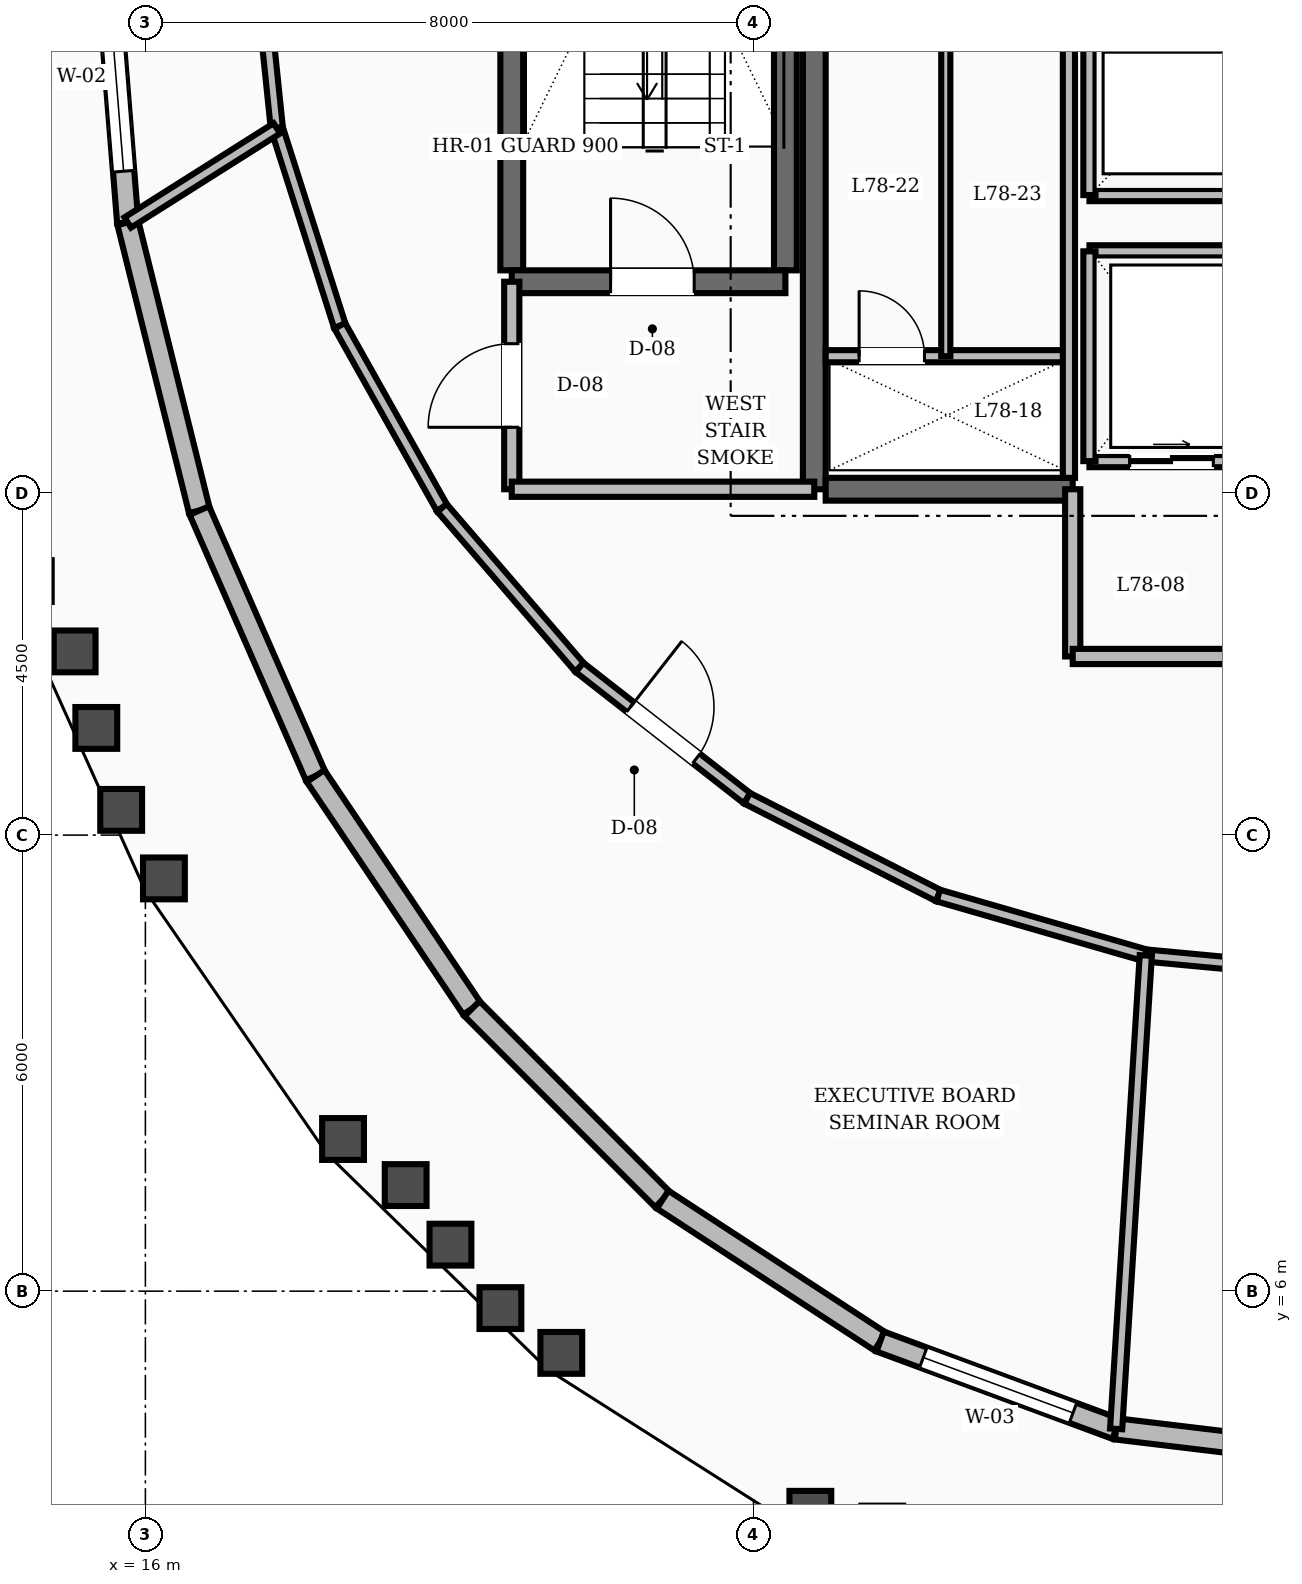
"""IFC4 building model, lengths in metres.
Left out: names, types, materials, properties, quantities, classifications, styles, units other than length and angle.
Written with IfcOpenShell. Run it as: python <this file> out.ifc"""

import sys

from ifc_helpers import new_model, si_unit, direction, frame, frame_2d, origin, place, context, subcontext, project, spatial, rectangle, extrude, element, fill, save


model = new_model("IFC4")
c1 = context("Model", 3, precision=1e-05, world=origin(), true_north=direction((0.0, 1.0)))
c2 = subcontext(c1, "Body", "Model", "MODEL_VIEW")
j1 = project(units=[si_unit("LENGTHUNIT", "METRE"), si_unit("PLANEANGLEUNIT", "RADIAN")], contexts=[c1])
p1 = place(None, origin())
s1 = spatial("IfcSite", under=j1, at=p1, CompositionType="ELEMENT")
p2 = place(p1, origin())
s2 = spatial("IfcBuilding", under=s1, at=p2, CompositionType="ELEMENT")
p3 = place(p2, frame((0.0, 0.0, 297.6)))
s3 = spatial("IfcBuildingStorey", under=s2, at=p3, CompositionType="ELEMENT", Elevation=297.6)
p4 = place(p3, frame((24.8, 16.55, 0.0), z_axis=(0.0, 0.0, 1.0), x_axis=(0.0, 1.0, 0.0)))
e1 = element("IfcWall", 1, at=p4, inside=s3, PredefinedType="SHEAR", context=c2, shape_type="SweptSolid", body=[
    extrude(rectangle(XDim=6.3, YDim=0.3, at=frame_2d((3.15, 0.0))), origin(), (0.0, 0.0, 1.0), 4.8),
])
p5 = place(p3, frame((24.95, 16.55, 0.0), z_axis=(0.0, 0.0, 1.0), x_axis=(1.0, 0.0, 0.0)))
e2 = element("IfcWall", 2, at=p5, inside=s3, PredefinedType="SHEAR", context=c2, shape_type="SweptSolid", body=[
    extrude(rectangle(XDim=3.25, YDim=0.3, at=frame_2d((1.625, 0.0))), origin(), (0.0, 0.0, 1.0), 4.8),
])
for number, where, z_axis, x_axis in (
    (3, (20.82, 19.43, 0.0), (0.0, 0.0, 1.0), (0.0, 1.0, 0.0)),
    (4, (24.42, 19.43, 0.0), (0.0, 0.0, 1.0), (0.0, 1.0, 0.0)),
):
    element("IfcWall", number, at=place(p3, frame(where, z_axis=z_axis, x_axis=x_axis)), inside=s3, PredefinedType="SHEAR", context=c2, shape_type="SweptSolid", body=[
        extrude(rectangle(XDim=8.74, YDim=0.3, at=frame_2d((4.37, 0.0))), origin(), (0.0, 0.0, 1.0), 4.8),
    ])
p6 = place(p3, frame((20.82, 19.28, 0.0), z_axis=(0.0, 0.0, 1.0), x_axis=(1.0, 0.0, 0.0)))
e5 = element("IfcWall", 5, at=p6, inside=s3, PredefinedType="SHEAR", context=c2, shape_type="SweptSolid", body=[
    extrude(rectangle(XDim=3.6, YDim=0.3, at=frame_2d((1.8, 0.0))), origin(), (0.0, 0.0, 1.0), 4.8),
])
p7 = place(p6, frame((1.3, 0.0, 0.0)))
e6 = element("IfcOpeningElement", 6, at=p7, cuts=e5, PredefinedType="OPENING", context=c2, shape_type="SweptSolid", body=[
    extrude(rectangle(XDim=1.1, YDim=2.1, at=frame_2d((0.55, 1.05))), frame((0.0, 0.16, 0.0), z_axis=(0.0, -1.0, 0.0), x_axis=(1.0, 0.0, 0.0)), (0.0, 0.0, 1.0), 0.32),
])
p8 = place(p3, frame((15.45, 24.0, 0.0), z_axis=(0.0, 0.0, 1.0), x_axis=(0.080459393336, -0.996757887365, 0.0)))
e7 = element("IfcWall", 7, at=p8, inside=s3, PredefinedType="STANDARD", context=c2, shape_type="SweptSolid", body=[
    extrude(rectangle(XDim=3.954, YDim=0.28, at=frame_2d((1.977, 0.0))), origin(), (0.0, 0.0, 1.0), 3.71),
])
p9 = place(p8, frame((0.677, 0.0, 0.8)))
e8 = element("IfcOpeningElement", 8, at=p9, cuts=e7, PredefinedType="OPENING", context=c2, shape_type="SweptSolid", body=[
    extrude(rectangle(XDim=2.6, YDim=1.65, at=frame_2d((1.3, 0.825))), frame((0.0, 0.15, 0.0), z_axis=(0.0, -1.0, 0.0), x_axis=(1.0, 0.0, 0.0)), (0.0, 0.0, 1.0), 0.3),
])
p10 = place(p3, frame((15.768, 20.059, 0.0), z_axis=(0.0, 0.0, 1.0), x_axis=(0.241167143082, -0.970483595481, 0.0)))
e9 = element("IfcWall", 9, at=p10, inside=s3, PredefinedType="STANDARD", context=c2, shape_type="SweptSolid", body=[
    extrude(rectangle(XDim=3.905, YDim=0.28, at=frame_2d((1.952, 0.0))), origin(), (0.0, 0.0, 1.0), 3.71),
])
p11 = place(p3, frame((16.71, 16.27, 0.0), z_axis=(0.0, 0.0, 1.0), x_axis=(0.401195046879, -0.91599264973, 0.0)))
e10 = element("IfcWall", 10, at=p11, inside=s3, PredefinedType="STANDARD", context=c2, shape_type="SweptSolid", body=[
    extrude(rectangle(XDim=3.812, YDim=0.28, at=frame_2d((1.906, 0.0))), origin(), (0.0, 0.0, 1.0), 3.71),
])
p12 = place(p3, frame((18.239, 12.778, 0.0), z_axis=(0.0, 0.0, 1.0), x_axis=(0.55793393731, -0.82988536654, 0.0)))
e11 = element("IfcWall", 11, at=p12, inside=s3, PredefinedType="STANDARD", context=c2, shape_type="SweptSolid", body=[
    extrude(rectangle(XDim=3.689, YDim=0.28, at=frame_2d((1.844, 0.0))), origin(), (0.0, 0.0, 1.0), 3.71),
])
p13 = place(p3, frame((20.297, 9.716, 0.0), z_axis=(0.0, 0.0, 1.0), x_axis=(0.706556343152, -0.707656791073, 0.0)))
e12 = element("IfcWall", 12, at=p13, inside=s3, PredefinedType="STANDARD", context=c2, shape_type="SweptSolid", body=[
    extrude(rectangle(XDim=3.55, YDim=0.28, at=frame_2d((1.775, 0.0))), origin(), (0.0, 0.0, 1.0), 3.71),
])
p14 = place(p3, frame((22.805, 7.204, 0.0), z_axis=(0.0, 0.0, 1.0), x_axis=(0.837506795295, -0.546426909875, 0.0)))
e13 = element("IfcWall", 13, at=p14, inside=s3, PredefinedType="STANDARD", context=c2, shape_type="SweptSolid", body=[
    extrude(rectangle(XDim=3.416, YDim=0.28, at=frame_2d((1.708, 0.0))), origin(), (0.0, 0.0, 1.0), 3.71),
])
p15 = place(p3, frame((25.667, 5.338, 0.0), z_axis=(0.0, 0.0, 1.0), x_axis=(0.937772775671, -0.347249508582, 0.0)))
e14 = element("IfcWall", 14, at=p15, inside=s3, PredefinedType="STANDARD", context=c2, shape_type="SweptSolid", body=[
    extrude(rectangle(XDim=3.311, YDim=0.28, at=frame_2d((1.655, 0.0))), origin(), (0.0, 0.0, 1.0), 3.71),
])
p16 = place(p15, frame((0.605, 0.0, 0.8)))
e15 = element("IfcOpeningElement", 15, at=p16, cuts=e14, PredefinedType="OPENING", context=c2, shape_type="SweptSolid", body=[
    extrude(rectangle(XDim=2.1, YDim=1.65, at=frame_2d((1.05, 0.825))), frame((0.0, 0.15, 0.0), z_axis=(0.0, -1.0, 0.0), x_axis=(1.0, 0.0, 0.0)), (0.0, 0.0, 1.0), 0.3),
])
p17 = place(p3, frame((28.771, 4.188, 0.0), z_axis=(0.0, 0.0, 1.0), x_axis=(0.992859065369, -0.119293236663, 0.0)))
e16 = element("IfcWall", 16, at=p17, inside=s3, PredefinedType="STANDARD", context=c2, shape_type="SweptSolid", body=[
    extrude(rectangle(XDim=3.252, YDim=0.28, at=frame_2d((1.626, 0.0))), origin(), (0.0, 0.0, 1.0), 3.71),
])
p18 = place(p3, frame((20.82, 16.55, 0.0), z_axis=(0.0, 0.0, 1.0), x_axis=(0.0, 1.0, 0.0)))
e17 = element("IfcWall", 17, at=p18, inside=s3, PredefinedType="SOLIDWALL", context=c2, shape_type="SweptSolid", body=[
    extrude(rectangle(XDim=2.73, YDim=0.2, at=frame_2d((1.365, 0.0))), origin(), (0.0, 0.0, 1.0), 3.71),
])
p19 = place(p18, frame((0.815, 0.0, 0.0)))
e18 = element("IfcOpeningElement", 18, at=p19, cuts=e17, PredefinedType="OPENING", context=c2, shape_type="SweptSolid", body=[
    extrude(rectangle(XDim=1.1, YDim=2.1, at=frame_2d((0.55, 1.05))), frame((0.0, 0.11, 0.0), z_axis=(0.0, -1.0, 0.0), x_axis=(1.0, 0.0, 0.0)), (0.0, 0.0, 1.0), 0.22),
])
p20 = place(p3, frame((20.82, 16.55, 0.0), z_axis=(0.0, 0.0, 1.0), x_axis=(1.0, 0.0, 0.0)))
e19 = element("IfcWall", 19, at=p20, inside=s3, PredefinedType="SOLIDWALL", context=c2, shape_type="SweptSolid", body=[
    extrude(rectangle(XDim=3.98, YDim=0.2, at=frame_2d((1.99, 0.0))), origin(), (0.0, 0.0, 1.0), 3.71),
])
p21 = place(p3, frame((28.2, 14.35, 0.0), z_axis=(0.0, 0.0, 1.0), x_axis=(0.0, 1.0, 0.0)))
e20 = element("IfcWall", 20, at=p21, inside=s3, PredefinedType="SOLIDWALL", context=c2, shape_type="SweptSolid", body=[
    extrude(rectangle(XDim=2.2, YDim=0.2, at=frame_2d((1.1, 0.0))), origin(), (0.0, 0.0, 1.0), 3.71),
])
p22 = place(p3, frame((28.2, 14.35, 0.0), z_axis=(0.0, 0.0, 1.0), x_axis=(1.0, 0.0, 0.0)))
e21 = element("IfcWall", 21, at=p22, inside=s3, PredefinedType="SOLIDWALL", context=c2, shape_type="SweptSolid", body=[
    extrude(rectangle(XDim=7.6, YDim=0.2, at=frame_2d((3.8, 0.0))), origin(), (0.0, 0.0, 1.0), 3.71),
])
p23 = place(p22, frame((3.2, 0.0, 0.0)))
e22 = element("IfcOpeningElement", 22, at=p23, cuts=e21, PredefinedType="OPENING", context=c2, shape_type="SweptSolid", body=[
    extrude(rectangle(XDim=1.2, YDim=2.1, at=frame_2d((0.6, 1.05))), frame((0.0, 0.11, 0.0), z_axis=(0.0, -1.0, 0.0), x_axis=(1.0, 0.0, 0.0)), (0.0, 0.0, 1.0), 0.22),
])
for number, where, z_axis, x_axis in (
    (23, (28.42, 20.42, 0.0), (0.0, 0.0, 1.0), (1.0, 0.0, 0.0)),
    (24, (28.42, 20.42, 0.0), (0.0, 0.0, 1.0), (0.0, 1.0, 0.0)),
):
    element("IfcWall", number, at=place(p3, frame(where, z_axis=z_axis, x_axis=x_axis)), inside=s3, PredefinedType="SOLIDWALL", context=c2, shape_type="SweptSolid", body=[
        extrude(rectangle(XDim=2.16, YDim=0.16, at=frame_2d((1.08, 0.0))), origin(), (0.0, 0.0, 1.0), 3.71),
    ])
p24 = place(p3, frame((28.42, 16.92, 0.0), z_axis=(0.0, 0.0, 1.0), x_axis=(1.0, 0.0, 0.0)))
e25 = element("IfcWall", 25, at=p24, inside=s3, PredefinedType="SOLIDWALL", context=c2, shape_type="SweptSolid", body=[
    extrude(rectangle(XDim=7.16, YDim=0.16, at=frame_2d((3.58, 0.0))), origin(), (0.0, 0.0, 1.0), 3.71),
])
p25 = place(p24, frame((0.53, 0.0, 0.0)))
e26 = element("IfcOpeningElement", 26, at=p25, cuts=e25, PredefinedType="OPENING", context=c2, shape_type="SweptSolid", body=[
    extrude(rectangle(XDim=1.1, YDim=2.15, at=frame_2d((0.55, 1.075))), frame((0.0, 0.09, 0.0), z_axis=(0.0, -1.0, 0.0), x_axis=(1.0, 0.0, 0.0)), (0.0, 0.0, 1.0), 0.18),
])
p26 = place(p24, frame((3.03, 0.0, 0.0)))
e27 = element("IfcOpeningElement", 27, at=p26, cuts=e25, PredefinedType="OPENING", context=c2, shape_type="SweptSolid", body=[
    extrude(rectangle(XDim=1.1, YDim=2.15, at=frame_2d((0.55, 1.075))), frame((0.0, 0.09, 0.0), z_axis=(0.0, -1.0, 0.0), x_axis=(1.0, 0.0, 0.0)), (0.0, 0.0, 1.0), 0.18),
])
p27 = place(p24, frame((5.53, 0.0, 0.0)))
e28 = element("IfcOpeningElement", 28, at=p27, cuts=e25, PredefinedType="OPENING", context=c2, shape_type="SweptSolid", body=[
    extrude(rectangle(XDim=1.1, YDim=2.15, at=frame_2d((0.55, 1.075))), frame((0.0, 0.09, 0.0), z_axis=(0.0, -1.0, 0.0), x_axis=(1.0, 0.0, 0.0)), (0.0, 0.0, 1.0), 0.18),
])
p28 = place(p3, frame((28.42, 19.68, 0.0), z_axis=(0.0, 0.0, 1.0), x_axis=(1.0, 0.0, 0.0)))
e29 = element("IfcWall", 29, at=p28, inside=s3, PredefinedType="SOLIDWALL", context=c2, shape_type="SweptSolid", body=[
    extrude(rectangle(XDim=7.16, YDim=0.16, at=frame_2d((3.58, 0.0))), origin(), (0.0, 0.0, 1.0), 3.71),
])
p29 = place(p3, frame((28.42, 16.92, 0.0), z_axis=(0.0, 0.0, 1.0), x_axis=(0.0, 1.0, 0.0)))
e30 = element("IfcWall", 30, at=p29, inside=s3, PredefinedType="SOLIDWALL", context=c2, shape_type="SweptSolid", body=[
    extrude(rectangle(XDim=2.76, YDim=0.16, at=frame_2d((1.38, 0.0))), origin(), (0.0, 0.0, 1.0), 3.71),
])
p30 = place(p3, frame((24.95, 18.3, 0.0), z_axis=(0.0, 0.0, 1.0), x_axis=(1.0, 0.0, 0.0)))
e31 = element("IfcWall", 31, at=p30, inside=s3, PredefinedType="SOLIDWALL", context=c2, shape_type="SweptSolid", body=[
    extrude(rectangle(XDim=3.2, YDim=0.16, at=frame_2d((1.6, 0.0))), origin(), (0.0, 0.0, 1.0), 3.71),
])
p31 = place(p30, frame((0.44, 0.0, 0.0)))
e32 = element("IfcOpeningElement", 32, at=p31, cuts=e31, PredefinedType="OPENING", context=c2, shape_type="SweptSolid", body=[
    extrude(rectangle(XDim=0.86, YDim=2.05, at=frame_2d((0.43, 1.025))), frame((0.0, 0.09, 0.0), z_axis=(0.0, -1.0, 0.0), x_axis=(1.0, 0.0, 0.0)), (0.0, 0.0, 1.0), 0.18),
])
p32 = place(p3, frame((28.15, 16.7, 0.0), z_axis=(0.0, 0.0, 1.0), x_axis=(0.0, 1.0, 0.0)))
e33 = element("IfcWall", 33, at=p32, inside=s3, PredefinedType="SOLIDWALL", context=c2, shape_type="SweptSolid", body=[
    extrude(rectangle(XDim=6.05, YDim=0.16, at=frame_2d((3.025, 0.0))), origin(), (0.0, 0.0, 1.0), 3.71),
])
p33 = place(p3, frame((26.53, 18.3, 0.0), z_axis=(0.0, 0.0, 1.0), x_axis=(0.0, 1.0, 0.0)))
e34 = element("IfcWall", 34, at=p33, inside=s3, PredefinedType="PARTITIONING", context=c2, shape_type="SweptSolid", body=[
    extrude(rectangle(XDim=4.45, YDim=0.12, at=frame_2d((2.225, 0.0))), origin(), (0.0, 0.0, 1.0), 3.71),
])
p34 = place(p3, frame((17.45, 24.0, 0.0), z_axis=(0.0, 0.0, 1.0), x_axis=(0.102911416913, -0.994690524871, 0.0)))
e35 = element("IfcWall", 35, at=p34, inside=s3, PredefinedType="SOLIDWALL", context=c2, shape_type="SweptSolid", body=[
    extrude(rectangle(XDim=2.716, YDim=0.16, at=frame_2d((1.358, 0.0))), origin(), (0.0, 0.0, 1.0), 3.71),
])
p35 = place(p3, frame((17.729, 21.298, 0.0), z_axis=(0.0, 0.0, 1.0), x_axis=(0.303658118342, -0.952781059407, 0.0)))
e36 = element("IfcWall", 36, at=p35, inside=s3, PredefinedType="SOLIDWALL", context=c2, shape_type="SweptSolid", body=[
    extrude(rectangle(XDim=2.727, YDim=0.16, at=frame_2d((1.364, 0.0))), origin(), (0.0, 0.0, 1.0), 3.71),
])
p36 = place(p3, frame((18.558, 18.7, 0.0), z_axis=(0.0, 0.0, 1.0), x_axis=(0.48962370511, -0.871933843474, 0.0)))
e37 = element("IfcWall", 37, at=p36, inside=s3, PredefinedType="SOLIDWALL", context=c2, shape_type="SweptSolid", body=[
    extrude(rectangle(XDim=2.746, YDim=0.16, at=frame_2d((1.373, 0.0))), origin(), (0.0, 0.0, 1.0), 3.71),
])
p37 = place(p3, frame((19.902, 16.305, 0.0), z_axis=(0.0, 0.0, 1.0), x_axis=(0.652979703778, -0.757375406555, 0.0)))
e38 = element("IfcWall", 38, at=p37, inside=s3, PredefinedType="SOLIDWALL", context=c2, shape_type="SweptSolid", body=[
    extrude(rectangle(XDim=2.771, YDim=0.16, at=frame_2d((1.386, 0.0))), origin(), (0.0, 0.0, 1.0), 3.71),
])
p38 = place(p3, frame((21.712, 14.207, 0.0), z_axis=(0.0, 0.0, 1.0), x_axis=(0.788044217139, -0.615618641558, 0.0)))
e39 = element("IfcWall", 39, at=p38, inside=s3, PredefinedType="SOLIDWALL", context=c2, shape_type="SweptSolid", body=[
    extrude(rectangle(XDim=2.798, YDim=0.16, at=frame_2d((1.399, 0.0))), origin(), (0.0, 0.0, 1.0), 3.71),
])
p39 = place(p38, frame((0.849, 0.0, 0.0)))
e40 = element("IfcOpeningElement", 40, at=p39, cuts=e39, PredefinedType="OPENING", context=c2, shape_type="SweptSolid", body=[
    extrude(rectangle(XDim=1.1, YDim=2.1, at=frame_2d((0.55, 1.05))), frame((0.0, 0.09, 0.0), z_axis=(0.0, -1.0, 0.0), x_axis=(1.0, 0.0, 0.0)), (0.0, 0.0, 1.0), 0.18),
])
p40 = place(p3, frame((23.917, 12.484, 0.0), z_axis=(0.0, 0.0, 1.0), x_axis=(0.891273737135, -0.453465682817, 0.0)))
e41 = element("IfcWall", 41, at=p40, inside=s3, PredefinedType="SOLIDWALL", context=c2, shape_type="SweptSolid", body=[
    extrude(rectangle(XDim=2.822, YDim=0.16, at=frame_2d((1.411, 0.0))), origin(), (0.0, 0.0, 1.0), 3.71),
])
p41 = place(p3, frame((26.432, 11.204, 0.0), z_axis=(0.0, 0.0, 1.0), x_axis=(0.96073200199, -0.277477963723, 0.0)))
e42 = element("IfcWall", 42, at=p41, inside=s3, PredefinedType="SOLIDWALL", context=c2, shape_type="SweptSolid", body=[
    extrude(rectangle(XDim=2.841, YDim=0.16, at=frame_2d((1.42, 0.0))), origin(), (0.0, 0.0, 1.0), 3.71),
])
p42 = place(p3, frame((29.161, 10.416, 0.0), z_axis=(0.0, 0.0, 1.0), x_axis=(0.995634474743, -0.093338056031, 0.0)))
e43 = element("IfcWall", 43, at=p42, inside=s3, PredefinedType="SOLIDWALL", context=c2, shape_type="SweptSolid", body=[
    extrude(rectangle(XDim=2.851, YDim=0.16, at=frame_2d((1.426, 0.0))), origin(), (0.0, 0.0, 1.0), 3.71),
])
p43 = place(p3, frame((17.729, 21.298, 0.0), z_axis=(0.0, 0.0, 1.0), x_axis=(-0.845446390163, -0.534060297495, 0.0)))
e44 = element("IfcWall", 44, at=p43, inside=s3, PredefinedType="SOLIDWALL", context=c2, shape_type="SweptSolid", body=[
    extrude(rectangle(XDim=2.32, YDim=0.16, at=frame_2d((1.16, 0.0))), origin(), (0.0, 0.0, 1.0), 3.71),
])
p44 = place(p3, frame((29.161, 10.416, 0.0), z_axis=(0.0, 0.0, 1.0), x_axis=(-0.062519556839, -0.998043739028, 0.0)))
e45 = element("IfcWall", 45, at=p44, inside=s3, PredefinedType="SOLIDWALL", context=c2, shape_type="SweptSolid", body=[
    extrude(rectangle(XDim=6.24, YDim=0.16, at=frame_2d((3.12, 0.0))), origin(), (0.0, 0.0, 1.0), 3.71),
])
p45 = place(p9, origin())
e46 = element("IfcWindow", 46, at=p45, inside=s3, PartitioningType="SINGLE_PANEL", PredefinedType="WINDOW", context=c2, shape_type="SweptSolid", body=[
    extrude(rectangle(XDim=2.6, YDim=1.65, at=frame_2d((1.3, 0.825))), frame((0.0, 0.03, 0.0), z_axis=(0.0, -1.0, 0.0), x_axis=(1.0, 0.0, 0.0)), (0.0, 0.0, 1.0), 0.06),
])
fill(e8, e46)
p46 = place(p16, origin())
e47 = element("IfcWindow", 47, at=p46, inside=s3, PartitioningType="SINGLE_PANEL", PredefinedType="WINDOW", context=c2, shape_type="SweptSolid", body=[
    extrude(rectangle(XDim=2.1, YDim=1.65, at=frame_2d((1.05, 0.825))), frame((0.0, 0.03, 0.0), z_axis=(0.0, -1.0, 0.0), x_axis=(1.0, 0.0, 0.0)), (0.0, 0.0, 1.0), 0.06),
])
fill(e15, e47)
p47 = place(p7, origin())
e48 = element("IfcDoor", 48, at=p47, inside=s3, OperationType="SINGLE_SWING_LEFT", PredefinedType="DOOR", context=c2, shape_type="SweptSolid", body=[
    extrude(rectangle(XDim=1.1, YDim=2.1, at=frame_2d((0.55, 1.05))), frame((0.0, 0.025, 0.0), z_axis=(0.0, -1.0, 0.0), x_axis=(1.0, 0.0, 0.0)), (0.0, 0.0, 1.0), 0.05),
])
fill(e6, e48)
p48 = place(p19, origin())
e49 = element("IfcDoor", 49, at=p48, inside=s3, OperationType="SINGLE_SWING_LEFT", PredefinedType="DOOR", context=c2, shape_type="SweptSolid", body=[
    extrude(rectangle(XDim=1.1, YDim=2.1, at=frame_2d((0.55, 1.05))), frame((0.0, 0.025, 0.0), z_axis=(0.0, -1.0, 0.0), x_axis=(1.0, 0.0, 0.0)), (0.0, 0.0, 1.0), 0.05),
])
fill(e18, e49)
p49 = place(p25, origin())
e50 = element("IfcDoor", 50, at=p49, inside=s3, OperationType="SLIDING_TO_RIGHT", PredefinedType="DOOR", context=c2, shape_type="SweptSolid", body=[
    extrude(rectangle(XDim=1.1, YDim=2.15, at=frame_2d((0.55, 1.075))), frame((0.0, 0.025, 0.0), z_axis=(0.0, -1.0, 0.0), x_axis=(1.0, 0.0, 0.0)), (0.0, 0.0, 1.0), 0.05),
])
fill(e26, e50)
p50 = place(p31, origin())
e51 = element("IfcDoor", 51, at=p50, inside=s3, OperationType="SINGLE_SWING_LEFT", PredefinedType="TRAPDOOR", context=c2, shape_type="SweptSolid", body=[
    extrude(rectangle(XDim=0.86, YDim=2.05, at=frame_2d((0.43, 1.025))), frame((0.0, 0.025, 0.0), z_axis=(0.0, -1.0, 0.0), x_axis=(1.0, 0.0, 0.0)), (0.0, 0.0, 1.0), 0.05),
])
fill(e32, e51)
p51 = place(p39, origin())
e52 = element("IfcDoor", 52, at=p51, inside=s3, OperationType="SINGLE_SWING_LEFT", PredefinedType="DOOR", context=c2, shape_type="SweptSolid", body=[
    extrude(rectangle(XDim=1.1, YDim=2.1, at=frame_2d((0.55, 1.05))), frame((0.0, 0.025, 0.0), z_axis=(0.0, -1.0, 0.0), x_axis=(1.0, 0.0, 0.0)), (0.0, 0.0, 1.0), 0.05),
])
fill(e40, e52)
save(model, sys.argv[1])
